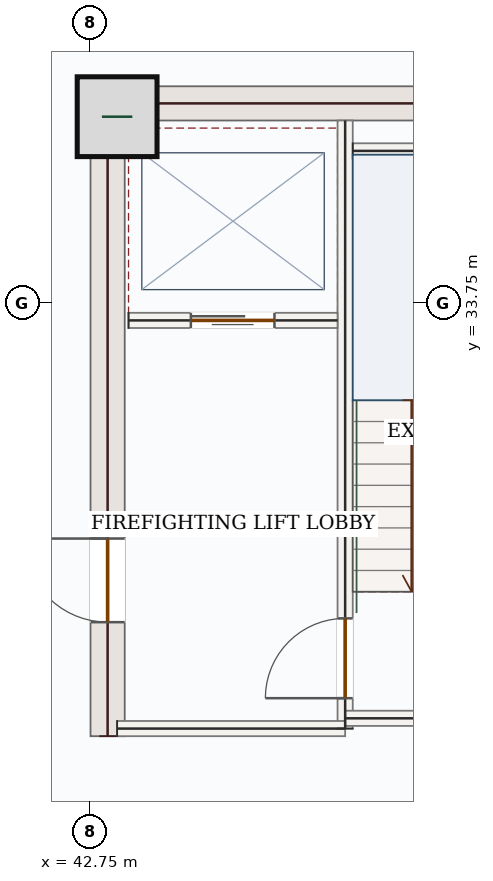
"""IFC4 building model, lengths in metres.
Left out: names, types, materials, properties, quantities, classifications, styles, units other than length and angle.
Written with IfcOpenShell. Run it as: python <this file> out.ifc"""

import sys

from ifc_helpers import new_model, si_unit, direction, frame, frame_2d, origin, origin_2d, place, context, subcontext, project, spatial, rectangle, extrude, source, transform, mapped, element, fill, save


model = new_model("IFC4")
c1 = context("Model", 3, precision=1e-05, world=origin(), true_north=direction((0.0, 1.0)))
c2 = subcontext(c1, "Body", "Model", "MODEL_VIEW")
j1 = project(units=[si_unit("LENGTHUNIT", "METRE"), si_unit("PLANEANGLEUNIT", "RADIAN")], contexts=[c1])
p1 = place(None, origin())
s1 = spatial("IfcSite", under=j1, at=p1, CompositionType="ELEMENT")
p2 = place(p1, origin())
s2 = spatial("IfcBuilding", under=s1, at=p2, CompositionType="ELEMENT")
p3 = place(p2, frame((0.0, 0.0, 284.1)))
s3 = spatial("IfcBuildingStorey", under=s2, at=p3, CompositionType="ELEMENT", Elevation=284.1)
p4 = place(p3, frame((42.975, 28.05, 0.0), z_axis=(0.0, 0.0, 1.0), x_axis=(0.0, 1.0, 0.0)))
e1 = element("IfcWall", 1, at=p4, inside=s3, PredefinedType="SHEAR", context=c2, shape_type="SweptSolid", body=[
    extrude(rectangle(XDim=8.55, YDim=0.45, at=frame_2d((4.275, 0.0))), origin(), (0.0, 0.0, 1.0), 3.5),
])
p5 = place(p4, frame((1.5, 0.0, 0.0)))
e2 = element("IfcOpeningElement", 2, at=p5, cuts=e1, PredefinedType="OPENING", context=c2, shape_type="SweptSolid", body=[
    extrude(rectangle(XDim=1.1, YDim=2.2, at=frame_2d((0.55, 1.1))), frame((0.0, 0.235, 0.0), z_axis=(0.0, -1.0, 0.0), x_axis=(1.0, 0.0, 0.0)), (0.0, 0.0, 1.0), 0.47),
])
m1 = source(origin(), c2, "Body", "SweptSolid", [
    extrude(rectangle(XDim=7.1, YDim=0.45, at=frame_2d((3.55, 0.0))), origin(), (0.0, 0.0, 1.0), 3.5),
])
p6 = place(p3, frame((43.2, 36.375, 0.0), z_axis=(0.0, 0.0, 1.0), x_axis=(1.0, 0.0, 0.0)))
e3 = element("IfcWall", 3, at=p6, inside=s3, PredefinedType="SHEAR", context=c2, shape_type="MappedRepresentation", body=[
    mapped(m1, transform((0.0, 0.0, 0.0), x_axis=(1.0, 0.0, 0.0), y_axis=(0.0, 1.0, 0.0), z_axis=(0.0, 0.0, 1.0), scale=1.0)),
])
m2 = source(origin(), c2, "Body", "SweptSolid", [
    extrude(rectangle(XDim=1.05, YDim=1.05, at=origin_2d()), origin(), (0.0, 0.0, 1.0), 3.75),
])
p7 = place(p3, frame((43.1, 36.2, 0.0), z_axis=(0.0, 0.0, 1.0), x_axis=(1.0, 0.0, 0.0)))
e4 = element("IfcColumn", 4, at=p7, inside=s3, PredefinedType="COLUMN", context=c2, shape_type="MappedRepresentation", body=[
    mapped(m2, transform((0.0, 0.0, 0.0), x_axis=(1.0, 0.0, 0.0), y_axis=(0.0, 1.0, 0.0), z_axis=(0.0, 0.0, 1.0), scale=1.0)),
])
p8 = place(p3, frame((46.1, 28.15, 0.0), z_axis=(0.0, 0.0, 1.0), x_axis=(0.0, 1.0, 0.0)))
e5 = element("IfcWall", 5, at=p8, inside=s3, PredefinedType="SOLIDWALL", context=c2, shape_type="SweptSolid", body=[
    extrude(rectangle(XDim=8.0, YDim=0.2, at=frame_2d((4.0, 0.0))), origin(), (0.0, 0.0, 1.0), 3.5),
])
p9 = place(p8, frame((0.4, 0.0, 0.0)))
e6 = element("IfcOpeningElement", 6, at=p9, cuts=e5, PredefinedType="OPENING", context=c2, shape_type="SweptSolid", body=[
    extrude(rectangle(XDim=1.05, YDim=2.15, at=frame_2d((0.525, 1.075))), frame((0.0, 0.11, 0.0), z_axis=(0.0, -1.0, 0.0), x_axis=(1.0, 0.0, 0.0)), (0.0, 0.0, 1.0), 0.22),
])
m3 = source(origin(), c2, "Body", "SweptSolid", [
    extrude(rectangle(XDim=3.0, YDim=0.2, at=frame_2d((1.5, 0.0))), origin(), (0.0, 0.0, 1.0), 3.5),
])
p10 = place(p3, frame((43.1, 28.15, 0.0), z_axis=(0.0, 0.0, 1.0), x_axis=(1.0, 0.0, 0.0)))
e7 = element("IfcWall", 7, at=p10, inside=s3, PredefinedType="SOLIDWALL", context=c2, shape_type="MappedRepresentation", body=[
    mapped(m3, transform((0.0, 0.0, 0.0), x_axis=(1.0, 0.0, 0.0), y_axis=(0.0, 1.0, 0.0), z_axis=(0.0, 0.0, 1.0), scale=1.0)),
])
m4 = source(origin(), c2, "Body", "SweptSolid", [
    extrude(rectangle(XDim=4.25, YDim=0.2, at=frame_2d((2.125, 0.0))), origin(), (0.0, 0.0, 1.0), 3.5),
])
p11 = place(p3, frame((46.1, 28.285, 0.0), z_axis=(0.0, 0.0, 1.0), x_axis=(1.0, 0.0, 0.0)))
e8 = element("IfcWall", 8, at=p11, inside=s3, PredefinedType="SOLIDWALL", context=c2, shape_type="MappedRepresentation", body=[
    mapped(m4, transform((0.0, 0.0, 0.0), x_axis=(1.0, 0.0, 0.0), y_axis=(0.0, 1.0, 0.0), z_axis=(0.0, 0.0, 1.0), scale=1.0)),
])
m5 = source(origin(), c2, "Body", "SweptSolid", [
    extrude(rectangle(XDim=3.25, YDim=0.2, at=frame_2d((1.625, 0.0))), origin(), (0.0, 0.0, 1.0), 3.5),
])
p12 = place(p3, frame((46.2, 35.75, 0.0), z_axis=(0.0, 0.0, 1.0), x_axis=(1.0, 0.0, 0.0)))
e9 = element("IfcWall", 9, at=p12, inside=s3, PredefinedType="SOLIDWALL", context=c2, shape_type="MappedRepresentation", body=[
    mapped(m5, transform((0.0, 0.0, 0.0), x_axis=(1.0, 0.0, 0.0), y_axis=(0.0, 1.0, 0.0), z_axis=(0.0, 0.0, 1.0), scale=1.0)),
])
p13 = place(p3, frame((43.25, 33.52, 0.0), z_axis=(0.0, 0.0, 1.0), x_axis=(1.0, 0.0, 0.0)))
e10 = element("IfcWall", 10, at=p13, inside=s3, PredefinedType="SOLIDWALL", context=c2, shape_type="SweptSolid", body=[
    extrude(rectangle(XDim=2.75, YDim=0.2, at=frame_2d((1.375, 0.0))), origin(), (0.0, 0.0, 1.0), 3.5),
])
p14 = place(p13, frame((0.82, 0.0, 0.0)))
e11 = element("IfcOpeningElement", 11, at=p14, cuts=e10, PredefinedType="OPENING", context=c2, shape_type="SweptSolid", body=[
    extrude(rectangle(XDim=1.1, YDim=2.15, at=frame_2d((0.55, 1.075))), frame((0.0, 0.11, 0.0), z_axis=(0.0, -1.0, 0.0), x_axis=(1.0, 0.0, 0.0)), (0.0, 0.0, 1.0), 0.22),
])
m6 = source(origin(), c2, "Body", "SweptSolid", [
    extrude(rectangle(XDim=1.05, YDim=2.15, at=frame_2d((0.525, 1.075))), frame((0.0, 0.025, 0.0), z_axis=(0.0, -1.0, 0.0), x_axis=(1.0, 0.0, 0.0)), (0.0, 0.0, 1.0), 0.05),
])
p15 = place(p9, origin())
e12 = element("IfcDoor", 12, at=p15, inside=s3, OperationType="SINGLE_SWING_LEFT", PredefinedType="DOOR", context=c2, shape_type="MappedRepresentation", body=[
    mapped(m6, transform((0.0, 0.0, 0.0), x_axis=(1.0, 0.0, 0.0), y_axis=(0.0, 1.0, 0.0), z_axis=(0.0, 0.0, 1.0), scale=1.0)),
])
fill(e6, e12)
m7 = source(origin(), c2, "Body", "SweptSolid", [
    extrude(rectangle(XDim=1.1, YDim=2.15, at=frame_2d((0.55, 1.075))), frame((0.0, 0.025, 0.0), z_axis=(0.0, -1.0, 0.0), x_axis=(1.0, 0.0, 0.0)), (0.0, 0.0, 1.0), 0.05),
])
p16 = place(p14, origin())
e13 = element("IfcDoor", 13, at=p16, inside=s3, OperationType="DOUBLE_DOOR_SLIDING", PredefinedType="DOOR", context=c2, shape_type="MappedRepresentation", body=[
    mapped(m7, transform((0.0, 0.0, 0.0), x_axis=(1.0, 0.0, 0.0), y_axis=(0.0, 1.0, 0.0), z_axis=(0.0, 0.0, 1.0), scale=1.0)),
])
fill(e11, e13)
m8 = source(origin(), c2, "Body", "SweptSolid", [
    extrude(rectangle(XDim=1.1, YDim=2.2, at=frame_2d((0.55, 1.1))), frame((0.0, 0.025, 0.0), z_axis=(0.0, -1.0, 0.0), x_axis=(1.0, 0.0, 0.0)), (0.0, 0.0, 1.0), 0.05),
])
p17 = place(p5, origin())
e14 = element("IfcDoor", 14, at=p17, inside=s3, OperationType="SINGLE_SWING_RIGHT", PredefinedType="DOOR", context=c2, shape_type="MappedRepresentation", body=[
    mapped(m8, transform((0.0, 0.0, 0.0), x_axis=(1.0, 0.0, 0.0), y_axis=(0.0, 1.0, 0.0), z_axis=(0.0, 0.0, 1.0), scale=1.0)),
])
fill(e2, e14)
save(model, sys.argv[1])
